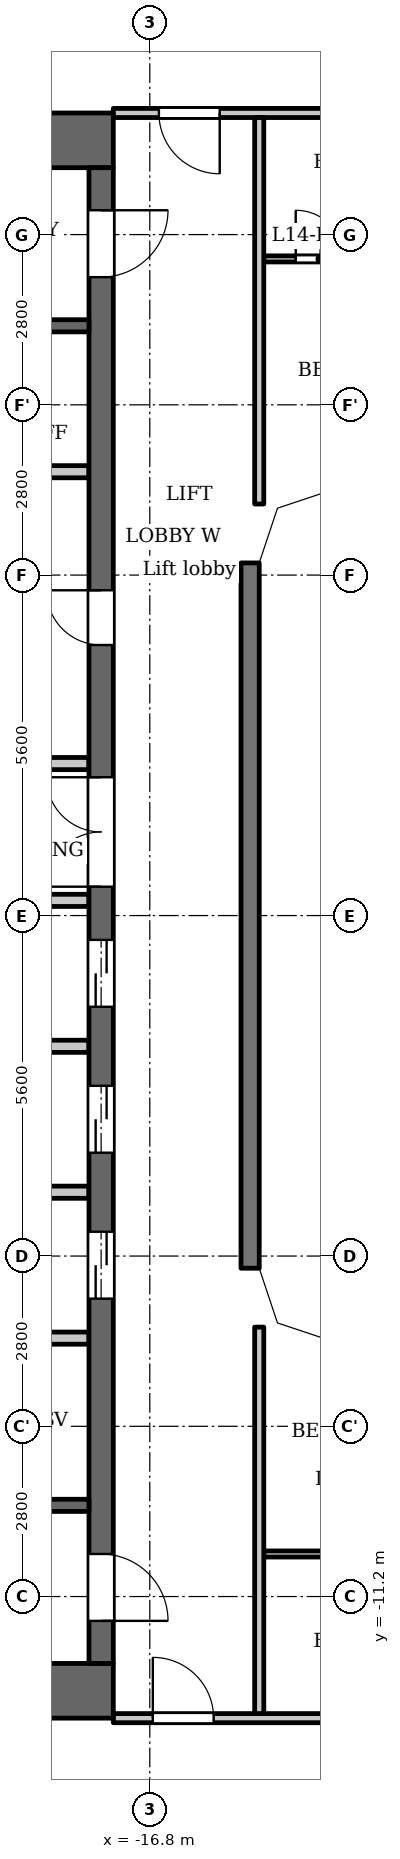
"""IFC4 building model, lengths in metres.
Left out: names, types, materials, properties, quantities, classifications, styles, units other than length and angle.
Written with IfcOpenShell. Run it as: python <this file> out.ifc"""

import sys

from ifc_helpers import new_model, si_unit, direction, frame, frame_2d, origin, place, context, subcontext, project, spatial, polyline, rectangle, outline, extrude, element, fill, save


model = new_model("IFC4")
c1 = context("Model", 3, precision=1e-05, world=origin(), true_north=direction((0.0, 1.0)))
c2 = subcontext(c1, "Body", "Model", "MODEL_VIEW")
j1 = project(units=[si_unit("LENGTHUNIT", "METRE"), si_unit("PLANEANGLEUNIT", "RADIAN")], contexts=[c1])
p1 = place(None, origin())
s1 = spatial("IfcSite", under=j1, at=p1, CompositionType="ELEMENT")
p2 = place(p1, origin())
s2 = spatial("IfcBuilding", under=s1, at=p2, CompositionType="ELEMENT")
p3 = place(p2, frame((0.0, 0.0, 58.5)))
s3 = spatial("IfcBuildingStorey", under=s2, at=p3, CompositionType="ELEMENT", Elevation=58.5)
p4 = place(p3, frame((-15.15, -5.8, 0.0), z_axis=(0.0, 0.0, 1.0), x_axis=(0.0, 1.0, 0.0)))
e1 = element("IfcWall", 1, at=p4, inside=s3, PredefinedType="SOLIDWALL", context=c2, shape_type="SweptSolid", body=[
    extrude(rectangle(XDim=11.6, YDim=0.3, at=frame_2d((5.8, 0.0))), origin(), (0.0, 0.0, 1.0), 3.2),
])
for number, where, z_axis, x_axis in (
    (2, (-17.4, 12.75, 0.0), (0.0, 0.0, 1.0), (-1.0, 0.0, 0.0)),
    (3, (-17.4, -12.75, 0.0), (0.0, 0.0, 1.0), (-1.0, 0.0, 0.0)),
):
    element("IfcWall", number, at=place(p3, frame(where, z_axis=z_axis, x_axis=x_axis)), inside=s3, PredefinedType="SHEAR", context=c2, shape_type="SweptSolid", body=[
        extrude(rectangle(XDim=10.4, YDim=0.9, at=frame_2d((5.2, 0.0))), origin(), (0.0, 0.0, 1.0), 3.2),
    ])
p5 = place(p3, frame((-17.6, -12.3, 0.0), z_axis=(0.0, 0.0, 1.0), x_axis=(0.0, 1.0, 0.0)))
e4 = element("IfcWall", 4, at=p5, inside=s3, PredefinedType="SHEAR", context=c2, shape_type="SweptSolid", body=[
    extrude(rectangle(XDim=24.6, YDim=0.4, at=frame_2d((12.3, 0.0))), origin(), (0.0, 0.0, 1.0), 3.2),
])
p6 = place(p5, frame((6.0, 0.0, 0.0)))
e5 = element("IfcOpeningElement", 5, at=p6, cuts=e4, PredefinedType="OPENING", context=c2, shape_type="SweptSolid", body=[
    extrude(rectangle(XDim=1.1, YDim=2.1, at=frame_2d((0.55, 1.05))), frame((0.0, 0.21, 0.0), z_axis=(0.0, -1.0, 0.0), x_axis=(1.0, 0.0, 0.0)), (0.0, 0.0, 1.0), 0.42),
])
p7 = place(p5, frame((8.4, 0.0, 0.0)))
e6 = element("IfcOpeningElement", 6, at=p7, cuts=e4, PredefinedType="OPENING", context=c2, shape_type="SweptSolid", body=[
    extrude(rectangle(XDim=1.1, YDim=2.1, at=frame_2d((0.55, 1.05))), frame((0.0, 0.21, 0.0), z_axis=(0.0, -1.0, 0.0), x_axis=(1.0, 0.0, 0.0)), (0.0, 0.0, 1.0), 0.42),
])
p8 = place(p5, frame((10.8, 0.0, 0.0)))
e7 = element("IfcOpeningElement", 7, at=p8, cuts=e4, PredefinedType="OPENING", context=c2, shape_type="SweptSolid", body=[
    extrude(rectangle(XDim=1.1, YDim=2.1, at=frame_2d((0.55, 1.05))), frame((0.0, 0.21, 0.0), z_axis=(0.0, -1.0, 0.0), x_axis=(1.0, 0.0, 0.0)), (0.0, 0.0, 1.0), 0.42),
])
p9 = place(p5, frame((16.75, 0.0, 0.0)))
e8 = element("IfcOpeningElement", 8, at=p9, cuts=e4, PredefinedType="OPENING", context=c2, shape_type="SweptSolid", body=[
    extrude(rectangle(XDim=0.9, YDim=2.1, at=frame_2d((0.45, 1.05))), frame((0.0, 0.21, 0.0), z_axis=(0.0, -1.0, 0.0), x_axis=(1.0, 0.0, 0.0)), (0.0, 0.0, 1.0), 0.42),
])
p10 = place(p5, frame((22.8, 0.0, 0.0)))
e9 = element("IfcOpeningElement", 9, at=p10, cuts=e4, PredefinedType="OPENING", context=c2, shape_type="SweptSolid", body=[
    extrude(rectangle(XDim=1.1, YDim=2.1, at=frame_2d((0.55, 1.05))), frame((0.0, 0.21, 0.0), z_axis=(0.0, -1.0, 0.0), x_axis=(1.0, 0.0, 0.0)), (0.0, 0.0, 1.0), 0.42),
])
p11 = place(p5, frame((0.7, 0.0, 0.0)))
e10 = element("IfcOpeningElement", 10, at=p11, cuts=e4, PredefinedType="OPENING", context=c2, shape_type="SweptSolid", body=[
    extrude(rectangle(XDim=1.1, YDim=2.1, at=frame_2d((0.55, 1.05))), frame((0.0, 0.21, 0.0), z_axis=(0.0, -1.0, 0.0), x_axis=(1.0, 0.0, 0.0)), (0.0, 0.0, 1.0), 0.42),
])
p12 = place(p5, frame((12.775, 0.0, 0.0)))
e11 = element("IfcOpeningElement", 11, at=p12, cuts=e4, PredefinedType="OPENING", context=c2, shape_type="SweptSolid", body=[
    extrude(rectangle(XDim=1.8, YDim=2.1, at=frame_2d((0.9, 1.05))), frame((0.0, 0.21, 0.0), z_axis=(0.0, -1.0, 0.0), x_axis=(1.0, 0.0, 0.0)), (0.0, 0.0, 1.0), 0.42),
])
p13 = place(p3, frame((-17.8, -9.7, 0.0), z_axis=(0.0, 0.0, 1.0), x_axis=(-1.0, 0.0, 0.0)))
e12 = element("IfcWall", 12, at=p13, inside=s3, PredefinedType="SHEAR", context=c2, shape_type="SweptSolid", body=[
    extrude(rectangle(XDim=8.3, YDim=0.2, at=frame_2d((4.15, 0.0))), origin(), (0.0, 0.0, 1.0), 3.2),
])
p14 = place(p13, frame((0.85, 0.0, 0.0)))
e13 = element("IfcOpeningElement", 13, at=p14, cuts=e12, PredefinedType="OPENING", context=c2, shape_type="SweptSolid", body=[
    extrude(rectangle(XDim=1.1, YDim=2.1, at=frame_2d((0.55, 1.05))), frame((0.0, 0.11, 0.0), z_axis=(0.0, -1.0, 0.0), x_axis=(1.0, 0.0, 0.0)), (0.0, 0.0, 1.0), 0.22),
])
p15 = place(p13, frame((3.75, 0.0, 0.0)))
e14 = element("IfcOpeningElement", 14, at=p15, cuts=e12, PredefinedType="OPENING", context=c2, shape_type="SweptSolid", body=[
    extrude(rectangle(XDim=1.1, YDim=2.1, at=frame_2d((0.55, 1.05))), frame((0.0, 0.11, 0.0), z_axis=(0.0, -1.0, 0.0), x_axis=(1.0, 0.0, 0.0)), (0.0, 0.0, 1.0), 0.22),
])
for number, where, z_axis, x_axis in (
    (15, (-17.8, -6.95, 0.0), (0.0, 0.0, 1.0), (-1.0, 0.0, 0.0)),
    (16, (-17.8, -4.55, 0.0), (0.0, 0.0, 1.0), (-1.0, 0.0, 0.0)),
    (17, (-17.8, -2.15, 0.0), (0.0, 0.0, 1.0), (-1.0, 0.0, 0.0)),
):
    element("IfcWall", number, at=place(p3, frame(where, z_axis=z_axis, x_axis=x_axis)), inside=s3, PredefinedType="PARTITIONING", context=c2, shape_type="SweptSolid", body=[
        extrude(rectangle(XDim=2.8, YDim=0.2, at=frame_2d((1.4, 0.0))), origin(), (0.0, 0.0, 1.0), 3.2),
    ])
for number, where, z_axis, x_axis in (
    (18, (-17.8, 0.25, 0.0), (0.0, 0.0, 1.0), (-1.0, 0.0, 0.0)),
    (19, (-17.8, 2.5, 0.0), (0.0, 0.0, 1.0), (-1.0, 0.0, 0.0)),
):
    element("IfcWall", number, at=place(p3, frame(where, z_axis=z_axis, x_axis=x_axis)), inside=s3, PredefinedType="PARTITIONING", context=c2, shape_type="SweptSolid", body=[
        extrude(rectangle(XDim=3.0, YDim=0.2, at=frame_2d((1.5, 0.0))), origin(), (0.0, 0.0, 1.0), 3.2),
    ])
p16 = place(p3, frame((-17.8, 7.3, 0.0), z_axis=(0.0, 0.0, 1.0), x_axis=(-1.0, 0.0, 0.0)))
e20 = element("IfcWall", 20, at=p16, inside=s3, PredefinedType="PARTITIONING", context=c2, shape_type="SweptSolid", body=[
    extrude(rectangle(XDim=2.8, YDim=0.2, at=frame_2d((1.4, 0.0))), origin(), (0.0, 0.0, 1.0), 3.2),
])
p17 = place(p3, frame((-17.8, 9.7, 0.0), z_axis=(0.0, 0.0, 1.0), x_axis=(-1.0, 0.0, 0.0)))
e21 = element("IfcWall", 21, at=p17, inside=s3, PredefinedType="SHEAR", context=c2, shape_type="SweptSolid", body=[
    extrude(rectangle(XDim=8.3, YDim=0.2, at=frame_2d((4.15, 0.0))), origin(), (0.0, 0.0, 1.0), 3.2),
])
p18 = place(p17, frame((0.85, 0.0, 0.0)))
e22 = element("IfcOpeningElement", 22, at=p18, cuts=e21, PredefinedType="OPENING", context=c2, shape_type="SweptSolid", body=[
    extrude(rectangle(XDim=1.1, YDim=2.1, at=frame_2d((0.55, 1.05))), frame((0.0, 0.11, 0.0), z_axis=(0.0, -1.0, 0.0), x_axis=(1.0, 0.0, 0.0)), (0.0, 0.0, 1.0), 0.22),
])
p19 = place(p17, frame((3.75, 0.0, 0.0)))
e23 = element("IfcOpeningElement", 23, at=p19, cuts=e21, PredefinedType="OPENING", context=c2, shape_type="SweptSolid", body=[
    extrude(rectangle(XDim=1.1, YDim=2.1, at=frame_2d((0.55, 1.05))), frame((0.0, 0.11, 0.0), z_axis=(0.0, -1.0, 0.0), x_axis=(1.0, 0.0, 0.0)), (0.0, 0.0, 1.0), 0.22),
])
p20 = place(p3, frame((-17.4, -13.2, 0.0), z_axis=(0.0, 0.0, 1.0), x_axis=(1.0, 0.0, 0.0)))
e24 = element("IfcWall", 24, at=p20, inside=s3, PredefinedType="PARTITIONING", context=c2, shape_type="SweptSolid", body=[
    extrude(rectangle(XDim=34.8, YDim=0.15, at=frame_2d((17.4, 0.0))), origin(), (0.0, 0.0, 1.0), 3.2),
])
p21 = place(p20, frame((0.65, 0.0, 0.0)))
e25 = element("IfcOpeningElement", 25, at=p21, cuts=e24, PredefinedType="OPENING", context=c2, shape_type="SweptSolid", body=[
    extrude(rectangle(XDim=1.0, YDim=2.1, at=frame_2d((0.5, 1.05))), frame((0.0, 0.085, 0.0), z_axis=(0.0, -1.0, 0.0), x_axis=(1.0, 0.0, 0.0)), (0.0, 0.0, 1.0), 0.17),
])
p22 = place(p20, frame((33.05, 0.0, 0.0)))
e26 = element("IfcOpeningElement", 26, at=p22, cuts=e24, PredefinedType="OPENING", context=c2, shape_type="SweptSolid", body=[
    extrude(rectangle(XDim=1.0, YDim=2.1, at=frame_2d((0.5, 1.05))), frame((0.0, 0.085, 0.0), z_axis=(0.0, -1.0, 0.0), x_axis=(1.0, 0.0, 0.0)), (0.0, 0.0, 1.0), 0.17),
])
p23 = place(p20, frame((10.15, 0.0, 0.0)))
e27 = element("IfcOpeningElement", 27, at=p23, cuts=e24, PredefinedType="OPENING", context=c2, shape_type="SweptSolid", body=[
    extrude(rectangle(XDim=1.0, YDim=2.1, at=frame_2d((0.5, 1.05))), frame((0.0, 0.085, 0.0), z_axis=(0.0, -1.0, 0.0), x_axis=(1.0, 0.0, 0.0)), (0.0, 0.0, 1.0), 0.17),
])
p24 = place(p20, frame((21.35, 0.0, 0.0)))
e28 = element("IfcOpeningElement", 28, at=p24, cuts=e24, PredefinedType="OPENING", context=c2, shape_type="SweptSolid", body=[
    extrude(rectangle(XDim=1.0, YDim=2.1, at=frame_2d((0.5, 1.05))), frame((0.0, 0.085, 0.0), z_axis=(0.0, -1.0, 0.0), x_axis=(1.0, 0.0, 0.0)), (0.0, 0.0, 1.0), 0.17),
])
p25 = place(p20, frame((30.75, 0.0, 0.0)))
e29 = element("IfcOpeningElement", 29, at=p25, cuts=e24, PredefinedType="OPENING", context=c2, shape_type="SweptSolid", body=[
    extrude(rectangle(XDim=1.0, YDim=2.1, at=frame_2d((0.5, 1.05))), frame((0.0, 0.085, 0.0), z_axis=(0.0, -1.0, 0.0), x_axis=(1.0, 0.0, 0.0)), (0.0, 0.0, 1.0), 0.17),
])
p26 = place(p3, frame((-14.925, -10.5, 0.0), z_axis=(0.0, 0.0, 1.0), x_axis=(1.0, 0.0, 0.0)))
e30 = element("IfcWall", 30, at=p26, inside=s3, PredefinedType="PARTITIONING", context=c2, shape_type="SweptSolid", body=[
    extrude(rectangle(XDim=29.85, YDim=0.1, at=frame_2d((14.925, 0.0))), origin(), (0.0, 0.0, 1.0), 3.2),
])
p27 = place(p26, frame((2.325, 0.0, 0.0)))
e31 = element("IfcOpeningElement", 31, at=p27, cuts=e30, PredefinedType="OPENING", context=c2, shape_type="SweptSolid", body=[
    extrude(rectangle(XDim=0.8, YDim=2.1, at=frame_2d((0.4, 1.05))), frame((0.0, 0.06, 0.0), z_axis=(0.0, -1.0, 0.0), x_axis=(1.0, 0.0, 0.0)), (0.0, 0.0, 1.0), 0.12),
])
p28 = place(p26, frame((7.775, 0.0, 0.0)))
e32 = element("IfcOpeningElement", 32, at=p28, cuts=e30, PredefinedType="OPENING", context=c2, shape_type="SweptSolid", body=[
    extrude(rectangle(XDim=0.9, YDim=2.1, at=frame_2d((0.45, 1.05))), frame((0.0, 0.06, 0.0), z_axis=(0.0, -1.0, 0.0), x_axis=(1.0, 0.0, 0.0)), (0.0, 0.0, 1.0), 0.12),
])
p29 = place(p26, frame((13.475, 0.0, 0.0)))
e33 = element("IfcOpeningElement", 33, at=p29, cuts=e30, PredefinedType="OPENING", context=c2, shape_type="SweptSolid", body=[
    extrude(rectangle(XDim=0.8, YDim=2.1, at=frame_2d((0.4, 1.05))), frame((0.0, 0.06, 0.0), z_axis=(0.0, -1.0, 0.0), x_axis=(1.0, 0.0, 0.0)), (0.0, 0.0, 1.0), 0.12),
])
p30 = place(p26, frame((18.975, 0.0, 0.0)))
e34 = element("IfcOpeningElement", 34, at=p30, cuts=e30, PredefinedType="OPENING", context=c2, shape_type="SweptSolid", body=[
    extrude(rectangle(XDim=0.9, YDim=2.1, at=frame_2d((0.45, 1.05))), frame((0.0, 0.06, 0.0), z_axis=(0.0, -1.0, 0.0), x_axis=(1.0, 0.0, 0.0)), (0.0, 0.0, 1.0), 0.12),
])
p31 = place(p26, frame((24.675, 0.0, 0.0)))
e35 = element("IfcOpeningElement", 35, at=p31, cuts=e30, PredefinedType="OPENING", context=c2, shape_type="SweptSolid", body=[
    extrude(rectangle(XDim=0.8, YDim=2.1, at=frame_2d((0.4, 1.05))), frame((0.0, 0.06, 0.0), z_axis=(0.0, -1.0, 0.0), x_axis=(1.0, 0.0, 0.0)), (0.0, 0.0, 1.0), 0.12),
])
p32 = place(p26, frame((28.375, 0.0, 0.0)))
e36 = element("IfcOpeningElement", 36, at=p32, cuts=e30, PredefinedType="OPENING", context=c2, shape_type="SweptSolid", body=[
    extrude(rectangle(XDim=0.9, YDim=2.1, at=frame_2d((0.45, 1.05))), frame((0.0, 0.06, 0.0), z_axis=(0.0, -1.0, 0.0), x_axis=(1.0, 0.0, 0.0)), (0.0, 0.0, 1.0), 0.12),
])
p33 = place(p3, frame((-14.925, 10.8, 0.0), z_axis=(0.0, 0.0, 1.0), x_axis=(1.0, 0.0, 0.0)))
e37 = element("IfcWall", 37, at=p33, inside=s3, PredefinedType="PARTITIONING", context=c2, shape_type="SweptSolid", body=[
    extrude(rectangle(XDim=29.85, YDim=0.1, at=frame_2d((14.925, 0.0))), origin(), (0.0, 0.0, 1.0), 3.2),
])
p34 = place(p33, frame((0.525, 0.0, 0.0)))
e38 = element("IfcOpeningElement", 38, at=p34, cuts=e37, PredefinedType="OPENING", context=c2, shape_type="SweptSolid", body=[
    extrude(rectangle(XDim=0.8, YDim=2.1, at=frame_2d((0.4, 1.05))), frame((0.0, 0.06, 0.0), z_axis=(0.0, -1.0, 0.0), x_axis=(1.0, 0.0, 0.0)), (0.0, 0.0, 1.0), 0.12),
])
p35 = place(p33, frame((5.375, 0.0, 0.0)))
e39 = element("IfcOpeningElement", 39, at=p35, cuts=e37, PredefinedType="OPENING", context=c2, shape_type="SweptSolid", body=[
    extrude(rectangle(XDim=0.9, YDim=2.1, at=frame_2d((0.45, 1.05))), frame((0.0, 0.06, 0.0), z_axis=(0.0, -1.0, 0.0), x_axis=(1.0, 0.0, 0.0)), (0.0, 0.0, 1.0), 0.12),
])
p36 = place(p33, frame((10.875, 0.0, 0.0)))
e40 = element("IfcOpeningElement", 40, at=p36, cuts=e37, PredefinedType="OPENING", context=c2, shape_type="SweptSolid", body=[
    extrude(rectangle(XDim=0.8, YDim=2.1, at=frame_2d((0.4, 1.05))), frame((0.0, 0.06, 0.0), z_axis=(0.0, -1.0, 0.0), x_axis=(1.0, 0.0, 0.0)), (0.0, 0.0, 1.0), 0.12),
])
p37 = place(p33, frame((12.975, 0.0, 0.0)))
e41 = element("IfcOpeningElement", 41, at=p37, cuts=e37, PredefinedType="OPENING", context=c2, shape_type="SweptSolid", body=[
    extrude(rectangle(XDim=0.9, YDim=2.1, at=frame_2d((0.45, 1.05))), frame((0.0, 0.06, 0.0), z_axis=(0.0, -1.0, 0.0), x_axis=(1.0, 0.0, 0.0)), (0.0, 0.0, 1.0), 0.12),
])
p38 = place(p33, frame((16.575, 0.0, 0.0)))
e42 = element("IfcOpeningElement", 42, at=p38, cuts=e37, PredefinedType="OPENING", context=c2, shape_type="SweptSolid", body=[
    extrude(rectangle(XDim=0.9, YDim=2.1, at=frame_2d((0.45, 1.05))), frame((0.0, 0.06, 0.0), z_axis=(0.0, -1.0, 0.0), x_axis=(1.0, 0.0, 0.0)), (0.0, 0.0, 1.0), 0.12),
])
p39 = place(p33, frame((18.825, 0.0, 0.0)))
e43 = element("IfcOpeningElement", 43, at=p39, cuts=e37, PredefinedType="OPENING", context=c2, shape_type="SweptSolid", body=[
    extrude(rectangle(XDim=0.9, YDim=2.1, at=frame_2d((0.45, 1.05))), frame((0.0, 0.06, 0.0), z_axis=(0.0, -1.0, 0.0), x_axis=(1.0, 0.0, 0.0)), (0.0, 0.0, 1.0), 0.12),
])
p40 = place(p33, frame((21.175, 0.0, 0.0)))
e44 = element("IfcOpeningElement", 44, at=p40, cuts=e37, PredefinedType="OPENING", context=c2, shape_type="SweptSolid", body=[
    extrude(rectangle(XDim=0.8, YDim=2.1, at=frame_2d((0.4, 1.05))), frame((0.0, 0.06, 0.0), z_axis=(0.0, -1.0, 0.0), x_axis=(1.0, 0.0, 0.0)), (0.0, 0.0, 1.0), 0.12),
])
p41 = place(p33, frame((27.775, 0.0, 0.0)))
e45 = element("IfcOpeningElement", 45, at=p41, cuts=e37, PredefinedType="OPENING", context=c2, shape_type="SweptSolid", body=[
    extrude(rectangle(XDim=0.9, YDim=2.1, at=frame_2d((0.45, 1.05))), frame((0.0, 0.06, 0.0), z_axis=(0.0, -1.0, 0.0), x_axis=(1.0, 0.0, 0.0)), (0.0, 0.0, 1.0), 0.12),
])
p42 = place(p3, frame((-17.4, 13.2, 0.0), z_axis=(0.0, 0.0, 1.0), x_axis=(1.0, 0.0, 0.0)))
e46 = element("IfcWall", 46, at=p42, inside=s3, PredefinedType="PARTITIONING", context=c2, shape_type="SweptSolid", body=[
    extrude(rectangle(XDim=34.8, YDim=0.15, at=frame_2d((17.4, 0.0))), origin(), (0.0, 0.0, 1.0), 3.2),
])
p43 = place(p42, frame((0.75, 0.0, 0.0)))
e47 = element("IfcOpeningElement", 47, at=p43, cuts=e46, PredefinedType="OPENING", context=c2, shape_type="SweptSolid", body=[
    extrude(rectangle(XDim=1.0, YDim=2.1, at=frame_2d((0.5, 1.05))), frame((0.0, 0.085, 0.0), z_axis=(0.0, -1.0, 0.0), x_axis=(1.0, 0.0, 0.0)), (0.0, 0.0, 1.0), 0.17),
])
p44 = place(p42, frame((33.15, 0.0, 0.0)))
e48 = element("IfcOpeningElement", 48, at=p44, cuts=e46, PredefinedType="OPENING", context=c2, shape_type="SweptSolid", body=[
    extrude(rectangle(XDim=1.0, YDim=2.1, at=frame_2d((0.5, 1.05))), frame((0.0, 0.085, 0.0), z_axis=(0.0, -1.0, 0.0), x_axis=(1.0, 0.0, 0.0)), (0.0, 0.0, 1.0), 0.17),
])
p45 = place(p42, frame((6.85, 0.0, 0.0)))
e49 = element("IfcOpeningElement", 49, at=p45, cuts=e46, PredefinedType="OPENING", context=c2, shape_type="SweptSolid", body=[
    extrude(rectangle(XDim=1.0, YDim=2.1, at=frame_2d((0.5, 1.05))), frame((0.0, 0.085, 0.0), z_axis=(0.0, -1.0, 0.0), x_axis=(1.0, 0.0, 0.0)), (0.0, 0.0, 1.0), 0.17),
])
p46 = place(p42, frame((18.05, 0.0, 0.0)))
e50 = element("IfcOpeningElement", 50, at=p46, cuts=e46, PredefinedType="OPENING", context=c2, shape_type="SweptSolid", body=[
    extrude(rectangle(XDim=1.0, YDim=2.1, at=frame_2d((0.5, 1.05))), frame((0.0, 0.085, 0.0), z_axis=(0.0, -1.0, 0.0), x_axis=(1.0, 0.0, 0.0)), (0.0, 0.0, 1.0), 0.17),
])
p47 = place(p42, frame((29.25, 0.0, 0.0)))
e51 = element("IfcOpeningElement", 51, at=p47, cuts=e46, PredefinedType="OPENING", context=c2, shape_type="SweptSolid", body=[
    extrude(rectangle(XDim=1.0, YDim=2.1, at=frame_2d((0.5, 1.05))), frame((0.0, 0.085, 0.0), z_axis=(0.0, -1.0, 0.0), x_axis=(1.0, 0.0, 0.0)), (0.0, 0.0, 1.0), 0.17),
])
for number, where, z_axis, x_axis in (
    (52, (-15.0, -13.125, 0.0), (0.0, 0.0, 1.0), (0.0, 1.0, 0.0)),
    (53, (-15.0, 6.769, 0.0), (0.0, 0.0, 1.0), (0.0, 1.0, 0.0)),
):
    element("IfcWall", number, at=place(p3, frame(where, z_axis=z_axis, x_axis=x_axis)), inside=s3, PredefinedType="PARTITIONING", context=c2, shape_type="SweptSolid", body=[
        extrude(rectangle(XDim=6.356, YDim=0.15, at=frame_2d((3.178, 0.0))), origin(), (0.0, 0.0, 1.0), 3.2),
    ])
p48 = place(p3, origin())
e54 = element("IfcWall", 54, at=p48, inside=s3, PredefinedType="SOLIDWALL", context=c2, shape_type="SweptSolid", body=[
    extrude(outline(polyline([(-13.849, 7.3), (-14.937, 6.937), (-15.3, 5.849), (-15.3, 5.8), (-15.0, 5.8), (-14.7, 6.7), (-13.8, 7.0), (-13.8, 7.3), (-13.849, 7.3)])), origin(), (0.0, 0.0, 1.0), 3.2),
])
e55 = element("IfcWall", 55, at=p48, inside=s3, PredefinedType="SOLIDWALL", context=c2, shape_type="SweptSolid", body=[
    extrude(outline(polyline([(-14.937, -6.937), (-13.849, -7.3), (-13.8, -7.3), (-13.8, -7.0), (-14.7, -6.7), (-15.0, -5.8), (-15.3, -5.8), (-15.3, -5.849), (-14.937, -6.937)])), origin(), (0.0, 0.0, 1.0), 3.2),
])
p49 = place(p6, origin())
e56 = element("IfcDoor", 56, at=p49, inside=s3, OperationType="DOUBLE_DOOR_SLIDING", PredefinedType="DOOR", context=c2, shape_type="SweptSolid", body=[
    extrude(rectangle(XDim=1.1, YDim=2.1, at=frame_2d((0.55, 1.05))), frame((0.0, 0.025, 0.0), z_axis=(0.0, -1.0, 0.0), x_axis=(1.0, 0.0, 0.0)), (0.0, 0.0, 1.0), 0.05),
])
fill(e5, e56)
p50 = place(p7, origin())
e57 = element("IfcDoor", 57, at=p50, inside=s3, OperationType="DOUBLE_DOOR_SLIDING", PredefinedType="DOOR", context=c2, shape_type="SweptSolid", body=[
    extrude(rectangle(XDim=1.1, YDim=2.1, at=frame_2d((0.55, 1.05))), frame((0.0, 0.025, 0.0), z_axis=(0.0, -1.0, 0.0), x_axis=(1.0, 0.0, 0.0)), (0.0, 0.0, 1.0), 0.05),
])
fill(e6, e57)
p51 = place(p8, origin())
e58 = element("IfcDoor", 58, at=p51, inside=s3, OperationType="DOUBLE_DOOR_SLIDING", PredefinedType="DOOR", context=c2, shape_type="SweptSolid", body=[
    extrude(rectangle(XDim=1.1, YDim=2.1, at=frame_2d((0.55, 1.05))), frame((0.0, 0.025, 0.0), z_axis=(0.0, -1.0, 0.0), x_axis=(1.0, 0.0, 0.0)), (0.0, 0.0, 1.0), 0.05),
])
fill(e7, e58)
p52 = place(p9, origin())
e59 = element("IfcDoor", 59, at=p52, inside=s3, OperationType="SINGLE_SWING_LEFT", PredefinedType="DOOR", context=c2, shape_type="SweptSolid", body=[
    extrude(rectangle(XDim=0.9, YDim=2.1, at=frame_2d((0.45, 1.05))), frame((0.0, 0.025, 0.0), z_axis=(0.0, -1.0, 0.0), x_axis=(1.0, 0.0, 0.0)), (0.0, 0.0, 1.0), 0.05),
])
fill(e8, e59)
p53 = place(p10, origin())
e60 = element("IfcDoor", 60, at=p53, inside=s3, OperationType="SINGLE_SWING_RIGHT", PredefinedType="DOOR", context=c2, shape_type="SweptSolid", body=[
    extrude(rectangle(XDim=1.1, YDim=2.1, at=frame_2d((0.55, 1.05))), frame((0.0, 0.025, 0.0), z_axis=(0.0, -1.0, 0.0), x_axis=(1.0, 0.0, 0.0)), (0.0, 0.0, 1.0), 0.05),
])
fill(e9, e60)
p54 = place(p11, origin())
e61 = element("IfcDoor", 61, at=p54, inside=s3, OperationType="SINGLE_SWING_LEFT", PredefinedType="DOOR", context=c2, shape_type="SweptSolid", body=[
    extrude(rectangle(XDim=1.1, YDim=2.1, at=frame_2d((0.55, 1.05))), frame((0.0, 0.025, 0.0), z_axis=(0.0, -1.0, 0.0), x_axis=(1.0, 0.0, 0.0)), (0.0, 0.0, 1.0), 0.05),
])
fill(e10, e61)
p55 = place(p12, origin())
e62 = element("IfcDoor", 62, at=p55, inside=s3, OperationType="DOUBLE_DOOR_SINGLE_SWING", PredefinedType="DOOR", context=c2, shape_type="SweptSolid", body=[
    extrude(rectangle(XDim=1.8, YDim=2.1, at=frame_2d((0.9, 1.05))), frame((0.0, 0.025, 0.0), z_axis=(0.0, -1.0, 0.0), x_axis=(1.0, 0.0, 0.0)), (0.0, 0.0, 1.0), 0.05),
])
fill(e11, e62)
p56 = place(p43, origin())
e63 = element("IfcDoor", 63, at=p56, inside=s3, OperationType="SINGLE_SWING_RIGHT", PredefinedType="DOOR", context=c2, shape_type="SweptSolid", body=[
    extrude(rectangle(XDim=1.0, YDim=2.1, at=frame_2d((0.5, 1.05))), frame((0.0, 0.025, 0.0), z_axis=(0.0, -1.0, 0.0), x_axis=(1.0, 0.0, 0.0)), (0.0, 0.0, 1.0), 0.05),
])
fill(e47, e63)
p57 = place(p21, origin())
e64 = element("IfcDoor", 64, at=p57, inside=s3, OperationType="SINGLE_SWING_RIGHT", PredefinedType="DOOR", context=c2, shape_type="SweptSolid", body=[
    extrude(rectangle(XDim=1.0, YDim=2.1, at=frame_2d((0.5, 1.05))), frame((0.0, 0.025, 0.0), z_axis=(0.0, -1.0, 0.0), x_axis=(1.0, 0.0, 0.0)), (0.0, 0.0, 1.0), 0.05),
])
fill(e25, e64)
p58 = place(p34, origin())
e65 = element("IfcDoor", 65, at=p58, inside=s3, OperationType="SINGLE_SWING_RIGHT", PredefinedType="DOOR", context=c2, shape_type="SweptSolid", body=[
    extrude(rectangle(XDim=0.8, YDim=2.1, at=frame_2d((0.4, 1.05))), frame((0.0, 0.025, 0.0), z_axis=(0.0, -1.0, 0.0), x_axis=(1.0, 0.0, 0.0)), (0.0, 0.0, 1.0), 0.05),
])
fill(e38, e65)
save(model, sys.argv[1])
